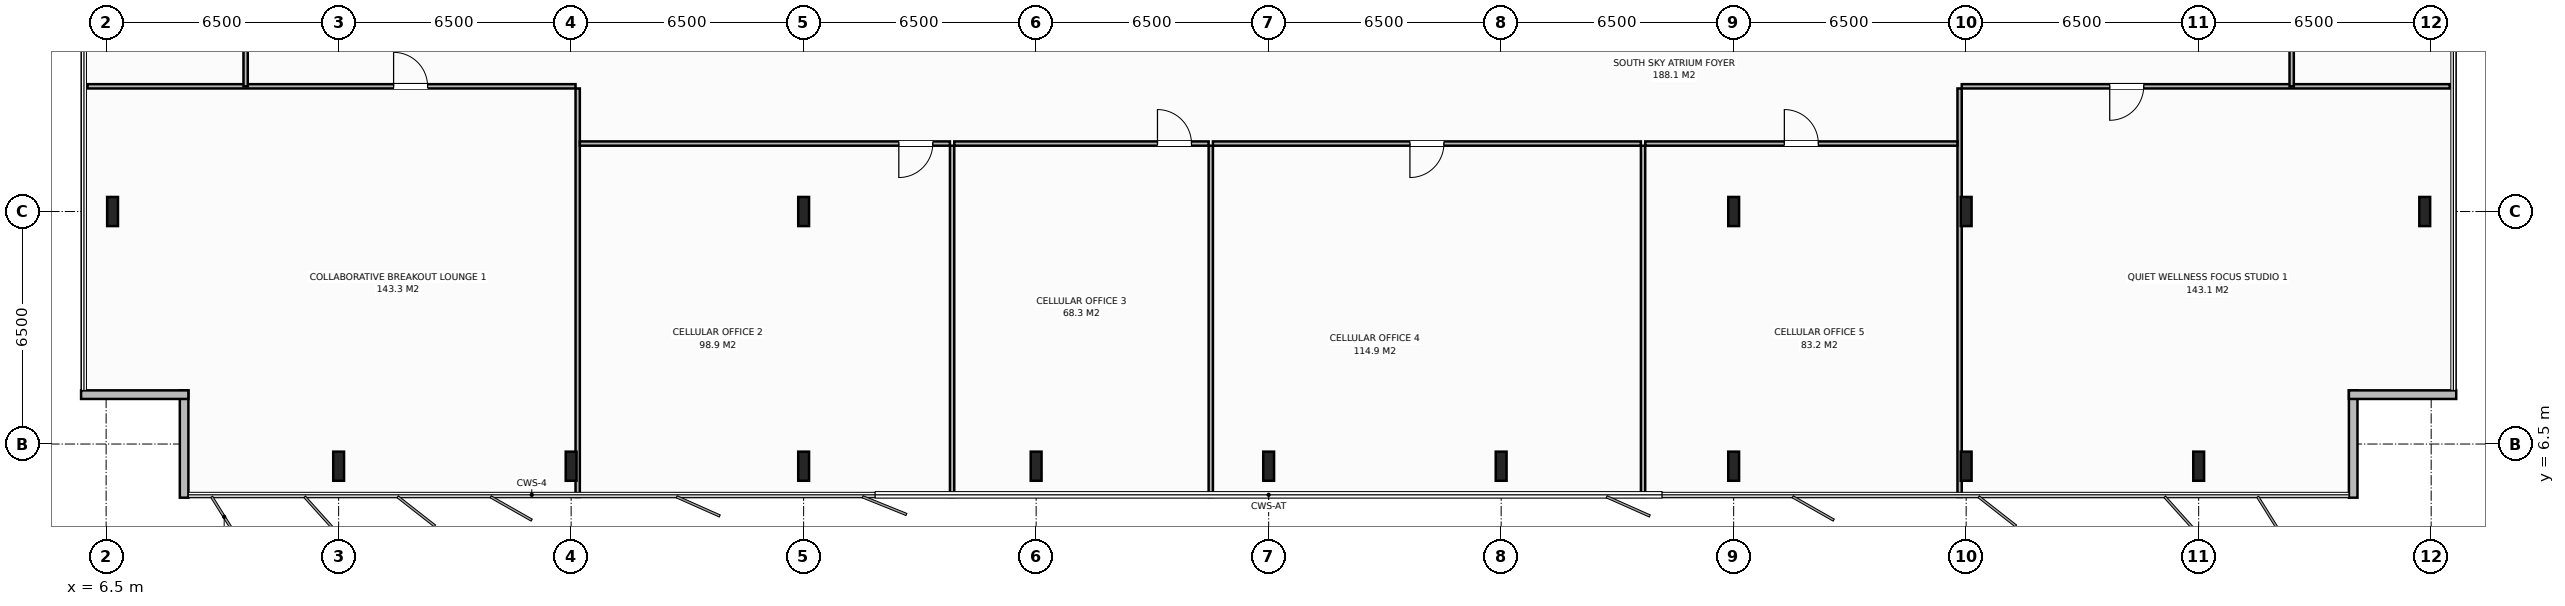
"""IFC4 building model, lengths in metres.
Left out: names, types, materials, properties, quantities, classifications, styles, units other than length and angle.
Written with IfcOpenShell. Run it as: python <this file> out.ifc"""

import sys

from ifc_helpers import new_model, si_unit, direction, frame, frame_2d, origin, origin_2d, place, context, subcontext, project, spatial, rectangle, i_section, extrude, element, fill, save


model = new_model("IFC4")
c1 = context("Model", 3, precision=1e-05, world=origin(), true_north=direction((0.0, 1.0)))
c2 = subcontext(c1, "Body", "Model", "MODEL_VIEW")
j1 = project(units=[si_unit("LENGTHUNIT", "METRE"), si_unit("PLANEANGLEUNIT", "RADIAN")], contexts=[c1])
p1 = place(None, origin())
s1 = spatial("IfcSite", under=j1, at=p1, CompositionType="ELEMENT")
p2 = place(p1, origin())
s2 = spatial("IfcBuilding", under=s1, at=p2, CompositionType="ELEMENT")
p3 = place(p2, frame((0.0, 0.0, 206.2)))
s3 = spatial("IfcBuildingStorey", under=s2, at=p3, CompositionType="ELEMENT", Elevation=206.2)
for number, where, z_axis, x_axis in (
    (1, (58.5, 13.0, 0.0), (0.0, 0.0, 1.0), (1.0, 0.0, 0.0)),
    (2, (26.0, 13.0, 0.0), (0.0, 0.0, 1.0), (1.0, 0.0, 0.0)),
    (3, (52.0, 13.0, 0.0), (0.0, 0.0, 1.0), (1.0, 0.0, 0.0)),
    (4, (13.0, 5.88, 0.0), (0.0, 0.0, 1.0), (1.0, 0.0, 0.0)),
    (5, (19.5, 5.88, 0.0), (0.0, 0.0, 1.0), (1.0, 0.0, 0.0)),
    (6, (26.0, 5.88, 0.0), (0.0, 0.0, 1.0), (1.0, 0.0, 0.0)),
    (7, (32.5, 5.88, 0.0), (0.0, 0.0, 1.0), (1.0, 0.0, 0.0)),
    (8, (39.0, 5.88, 0.0), (0.0, 0.0, 1.0), (1.0, 0.0, 0.0)),
    (9, (45.5, 5.88, 0.0), (0.0, 0.0, 1.0), (1.0, 0.0, 0.0)),
    (10, (52.0, 5.88, 0.0), (0.0, 0.0, 1.0), (1.0, 0.0, 0.0)),
    (11, (58.5, 5.88, 0.0), (0.0, 0.0, 1.0), (1.0, 0.0, 0.0)),
    (12, (65.0, 5.88, 0.0), (0.0, 0.0, 1.0), (1.0, 0.0, 0.0)),
    (13, (6.68, 13.0, 0.0), (0.0, 0.0, 1.0), (1.0, 0.0, 0.0)),
    (14, (71.32, 13.0, 0.0), (0.0, 0.0, 1.0), (1.0, 0.0, 0.0)),
):
    element("IfcColumn", number, at=place(p3, frame(where, z_axis=z_axis, x_axis=x_axis)), inside=s3, PredefinedType="COLUMN", context=c2, shape_type="SweptSolid", body=[
        extrude(i_section(OverallWidth=0.303, OverallDepth=0.814, WebThickness=0.021, FlangeThickness=0.04, at=origin_2d()), origin(), (0.0, 0.0, 1.0), 3.8),
    ])
for number, where, z_axis, x_axis in (
    (15, (8.68, 5.0, 0.0), (0.0, 0.0, 1.0), (0.0, 1.0, 0.0)),
    (16, (8.8, 7.88, 0.0), (0.0, 0.0, 1.0), (-1.0, 0.0, 0.0)),
    (17, (69.32, 8.0, 0.0), (0.0, 0.0, 1.0), (0.0, -1.0, 0.0)),
    (18, (72.2, 7.88, 0.0), (0.0, 0.0, 1.0), (-1.0, 0.0, 0.0)),
):
    element("IfcWall", number, at=place(p3, frame(where, z_axis=z_axis, x_axis=x_axis)), inside=s3, PredefinedType="STANDARD", context=c2, shape_type="SweptSolid", body=[
        extrude(rectangle(XDim=3.0, YDim=0.24, at=frame_2d((1.5, 0.0))), origin(), (0.0, 0.0, 1.0), 3.58),
    ])
p4 = place(p3, frame((19.683, 5.02, 0.0), z_axis=(0.0, 0.0, 1.0), x_axis=(0.0, 1.0, 0.0)))
e19 = element("IfcWall", 19, at=p4, inside=s3, PredefinedType="PARTITIONING", context=c2, shape_type="SweptSolid", body=[
    extrude(rectangle(XDim=11.42, YDim=0.12, at=frame_2d((5.71, 0.0))), origin(), (0.0, 0.0, 1.0), 2.88),
])
p5 = place(p3, frame((5.98, 16.5, 0.0), z_axis=(0.0, 0.0, 1.0), x_axis=(1.0, 0.0, 0.0)))
e20 = element("IfcWall", 20, at=p5, inside=s3, PredefinedType="PARTITIONING", context=c2, shape_type="SweptSolid", body=[
    extrude(rectangle(XDim=13.643, YDim=0.12, at=frame_2d((6.822, 0.0))), origin(), (0.0, 0.0, 1.0), 3.58),
])
p6 = place(p5, frame((8.557, 0.0, 0.0)))
e21 = element("IfcOpeningElement", 21, at=p6, cuts=e20, PredefinedType="OPENING", context=c2, shape_type="SweptSolid", body=[
    extrude(rectangle(XDim=0.95, YDim=2.15, at=frame_2d((0.475, 1.075))), frame((0.0, 0.07, 0.0), z_axis=(0.0, -1.0, 0.0), x_axis=(1.0, 0.0, 0.0)), (0.0, 0.0, 1.0), 0.14),
])
p7 = place(p3, frame((30.151, 5.02, 0.0), z_axis=(0.0, 0.0, 1.0), x_axis=(0.0, 1.0, 0.0)))
e22 = element("IfcWall", 22, at=p7, inside=s3, PredefinedType="PARTITIONING", context=c2, shape_type="SweptSolid", body=[
    extrude(rectangle(XDim=9.82, YDim=0.12, at=frame_2d((4.91, 0.0))), origin(), (0.0, 0.0, 1.0), 3.58),
])
p8 = place(p3, frame((19.743, 14.9, 0.0), z_axis=(0.0, 0.0, 1.0), x_axis=(1.0, 0.0, 0.0)))
e23 = element("IfcWall", 23, at=p8, inside=s3, PredefinedType="PARTITIONING", context=c2, shape_type="SweptSolid", body=[
    extrude(rectangle(XDim=10.347, YDim=0.12, at=frame_2d((5.174, 0.0))), origin(), (0.0, 0.0, 1.0), 3.58),
])
p9 = place(p8, frame((8.917, 0.0, 0.0)))
e24 = element("IfcOpeningElement", 24, at=p9, cuts=e23, PredefinedType="OPENING", context=c2, shape_type="SweptSolid", body=[
    extrude(rectangle(XDim=0.95, YDim=2.15, at=frame_2d((0.475, 1.075))), frame((0.0, 0.07, 0.0), z_axis=(0.0, -1.0, 0.0), x_axis=(1.0, 0.0, 0.0)), (0.0, 0.0, 1.0), 0.14),
])
p10 = place(p3, frame((37.382, 5.02, 0.0), z_axis=(0.0, 0.0, 1.0), x_axis=(0.0, 1.0, 0.0)))
e25 = element("IfcWall", 25, at=p10, inside=s3, PredefinedType="PARTITIONING", context=c2, shape_type="SweptSolid", body=[
    extrude(rectangle(XDim=9.82, YDim=0.12, at=frame_2d((4.91, 0.0))), origin(), (0.0, 0.0, 1.0), 3.58),
])
p11 = place(p3, frame((30.211, 14.9, 0.0), z_axis=(0.0, 0.0, 1.0), x_axis=(1.0, 0.0, 0.0)))
e26 = element("IfcWall", 26, at=p11, inside=s3, PredefinedType="PARTITIONING", context=c2, shape_type="SweptSolid", body=[
    extrude(rectangle(XDim=7.111, YDim=0.12, at=frame_2d((3.556, 0.0))), origin(), (0.0, 0.0, 1.0), 3.58),
])
p12 = place(p11, frame((5.681, 0.0, 0.0)))
e27 = element("IfcOpeningElement", 27, at=p12, cuts=e26, PredefinedType="OPENING", context=c2, shape_type="SweptSolid", body=[
    extrude(rectangle(XDim=0.95, YDim=2.15, at=frame_2d((0.475, 1.075))), frame((0.0, 0.07, 0.0), z_axis=(0.0, -1.0, 0.0), x_axis=(1.0, 0.0, 0.0)), (0.0, 0.0, 1.0), 0.14),
])
p13 = place(p3, frame((49.467, 5.02, 0.0), z_axis=(0.0, 0.0, 1.0), x_axis=(0.0, 1.0, 0.0)))
e28 = element("IfcWall", 28, at=p13, inside=s3, PredefinedType="PARTITIONING", context=c2, shape_type="SweptSolid", body=[
    extrude(rectangle(XDim=9.82, YDim=0.12, at=frame_2d((4.91, 0.0))), origin(), (0.0, 0.0, 1.0), 3.58),
])
p14 = place(p3, frame((37.442, 14.9, 0.0), z_axis=(0.0, 0.0, 1.0), x_axis=(1.0, 0.0, 0.0)))
e29 = element("IfcWall", 29, at=p14, inside=s3, PredefinedType="PARTITIONING", context=c2, shape_type="SweptSolid", body=[
    extrude(rectangle(XDim=11.965, YDim=0.12, at=frame_2d((5.983, 0.0))), origin(), (0.0, 0.0, 1.0), 3.58),
])
p15 = place(p14, frame((5.508, 0.0, 0.0)))
e30 = element("IfcOpeningElement", 30, at=p15, cuts=e29, PredefinedType="OPENING", context=c2, shape_type="SweptSolid", body=[
    extrude(rectangle(XDim=0.95, YDim=2.15, at=frame_2d((0.475, 1.075))), frame((0.0, 0.07, 0.0), z_axis=(0.0, -1.0, 0.0), x_axis=(1.0, 0.0, 0.0)), (0.0, 0.0, 1.0), 0.14),
])
p16 = place(p3, frame((58.317, 5.02, 0.0), z_axis=(0.0, 0.0, 1.0), x_axis=(0.0, 1.0, 0.0)))
e31 = element("IfcWall", 31, at=p16, inside=s3, PredefinedType="PARTITIONING", context=c2, shape_type="SweptSolid", body=[
    extrude(rectangle(XDim=11.42, YDim=0.12, at=frame_2d((5.71, 0.0))), origin(), (0.0, 0.0, 1.0), 2.88),
])
p17 = place(p3, frame((49.527, 14.9, 0.0), z_axis=(0.0, 0.0, 1.0), x_axis=(1.0, 0.0, 0.0)))
e32 = element("IfcWall", 32, at=p17, inside=s3, PredefinedType="PARTITIONING", context=c2, shape_type="SweptSolid", body=[
    extrude(rectangle(XDim=8.729, YDim=0.12, at=frame_2d((4.365, 0.0))), origin(), (0.0, 0.0, 1.0), 3.58),
])
p18 = place(p17, frame((3.89, 0.0, 0.0)))
e33 = element("IfcOpeningElement", 33, at=p18, cuts=e32, PredefinedType="OPENING", context=c2, shape_type="SweptSolid", body=[
    extrude(rectangle(XDim=0.95, YDim=2.15, at=frame_2d((0.475, 1.075))), frame((0.0, 0.07, 0.0), z_axis=(0.0, -1.0, 0.0), x_axis=(1.0, 0.0, 0.0)), (0.0, 0.0, 1.0), 0.14),
])
p19 = place(p3, frame((58.377, 16.5, 0.0), z_axis=(0.0, 0.0, 1.0), x_axis=(1.0, 0.0, 0.0)))
e34 = element("IfcWall", 34, at=p19, inside=s3, PredefinedType="PARTITIONING", context=c2, shape_type="SweptSolid", body=[
    extrude(rectangle(XDim=13.643, YDim=0.12, at=frame_2d((6.822, 0.0))), origin(), (0.0, 0.0, 1.0), 3.58),
])
p20 = place(p19, frame((4.137, 0.0, 0.0)))
e35 = element("IfcOpeningElement", 35, at=p20, cuts=e34, PredefinedType="OPENING", context=c2, shape_type="SweptSolid", body=[
    extrude(rectangle(XDim=0.95, YDim=2.15, at=frame_2d((0.475, 1.075))), frame((0.0, 0.07, 0.0), z_axis=(0.0, -1.0, 0.0), x_axis=(1.0, 0.0, 0.0)), (0.0, 0.0, 1.0), 0.14),
])
p21 = place(p3, frame((10.4, 16.5, 0.0), z_axis=(0.0, 0.0, 1.0), x_axis=(0.0, 1.0, 0.0)))
e36 = element("IfcWall", 36, at=p21, inside=s3, PredefinedType="PARTITIONING", context=c2, shape_type="SweptSolid", body=[
    extrude(rectangle(XDim=19.0, YDim=0.12, at=frame_2d((9.5, 0.0))), origin(), (0.0, 0.0, 1.0), 3.58),
])
p22 = place(p21, frame((9.025, 0.0, 0.0)))
e37 = element("IfcOpeningElement", 37, at=p22, cuts=e36, PredefinedType="OPENING", context=c2, shape_type="SweptSolid", body=[
    extrude(rectangle(XDim=0.95, YDim=2.15, at=frame_2d((0.475, 1.075))), frame((0.0, 0.07, 0.0), z_axis=(0.0, -1.0, 0.0), x_axis=(1.0, 0.0, 0.0)), (0.0, 0.0, 1.0), 0.14),
])
p23 = place(p3, frame((67.6, 16.5, 0.0), z_axis=(0.0, 0.0, 1.0), x_axis=(0.0, 1.0, 0.0)))
e38 = element("IfcWall", 38, at=p23, inside=s3, PredefinedType="PARTITIONING", context=c2, shape_type="SweptSolid", body=[
    extrude(rectangle(XDim=9.5, YDim=0.12, at=frame_2d((4.75, 0.0))), origin(), (0.0, 0.0, 1.0), 3.58),
])
p24 = place(p23, frame((5.325, 0.0, 0.0)))
e39 = element("IfcOpeningElement", 39, at=p24, cuts=e38, PredefinedType="OPENING", context=c2, shape_type="SweptSolid", body=[
    extrude(rectangle(XDim=0.95, YDim=2.15, at=frame_2d((0.475, 1.075))), frame((0.0, 0.07, 0.0), z_axis=(0.0, -1.0, 0.0), x_axis=(1.0, 0.0, 0.0)), (0.0, 0.0, 1.0), 0.14),
])
p25 = place(p6, origin())
e40 = element("IfcDoor", 40, at=p25, inside=s3, OperationType="SINGLE_SWING_LEFT", PredefinedType="DOOR", context=c2, shape_type="SweptSolid", body=[
    extrude(rectangle(XDim=0.95, YDim=2.15, at=frame_2d((0.475, 1.075))), frame((0.0, 0.025, 0.0), z_axis=(0.0, -1.0, 0.0), x_axis=(1.0, 0.0, 0.0)), (0.0, 0.0, 1.0), 0.05),
])
fill(e21, e40)
p26 = place(p9, origin())
e41 = element("IfcDoor", 41, at=p26, inside=s3, OperationType="SINGLE_SWING_RIGHT", PredefinedType="DOOR", context=c2, shape_type="SweptSolid", body=[
    extrude(rectangle(XDim=0.95, YDim=2.15, at=frame_2d((0.475, 1.075))), frame((0.0, 0.025, 0.0), z_axis=(0.0, -1.0, 0.0), x_axis=(1.0, 0.0, 0.0)), (0.0, 0.0, 1.0), 0.05),
])
fill(e24, e41)
p27 = place(p12, origin())
e42 = element("IfcDoor", 42, at=p27, inside=s3, OperationType="SINGLE_SWING_LEFT", PredefinedType="DOOR", context=c2, shape_type="SweptSolid", body=[
    extrude(rectangle(XDim=0.95, YDim=2.15, at=frame_2d((0.475, 1.075))), frame((0.0, 0.025, 0.0), z_axis=(0.0, -1.0, 0.0), x_axis=(1.0, 0.0, 0.0)), (0.0, 0.0, 1.0), 0.05),
])
fill(e27, e42)
p28 = place(p15, origin())
e43 = element("IfcDoor", 43, at=p28, inside=s3, OperationType="SINGLE_SWING_RIGHT", PredefinedType="DOOR", context=c2, shape_type="SweptSolid", body=[
    extrude(rectangle(XDim=0.95, YDim=2.15, at=frame_2d((0.475, 1.075))), frame((0.0, 0.025, 0.0), z_axis=(0.0, -1.0, 0.0), x_axis=(1.0, 0.0, 0.0)), (0.0, 0.0, 1.0), 0.05),
])
fill(e30, e43)
p29 = place(p18, origin())
e44 = element("IfcDoor", 44, at=p29, inside=s3, OperationType="SINGLE_SWING_LEFT", PredefinedType="DOOR", context=c2, shape_type="SweptSolid", body=[
    extrude(rectangle(XDim=0.95, YDim=2.15, at=frame_2d((0.475, 1.075))), frame((0.0, 0.025, 0.0), z_axis=(0.0, -1.0, 0.0), x_axis=(1.0, 0.0, 0.0)), (0.0, 0.0, 1.0), 0.05),
])
fill(e33, e44)
p30 = place(p20, origin())
e45 = element("IfcDoor", 45, at=p30, inside=s3, OperationType="SINGLE_SWING_RIGHT", PredefinedType="DOOR", context=c2, shape_type="SweptSolid", body=[
    extrude(rectangle(XDim=0.95, YDim=2.15, at=frame_2d((0.475, 1.075))), frame((0.0, 0.025, 0.0), z_axis=(0.0, -1.0, 0.0), x_axis=(1.0, 0.0, 0.0)), (0.0, 0.0, 1.0), 0.05),
])
fill(e35, e45)
save(model, sys.argv[1])
